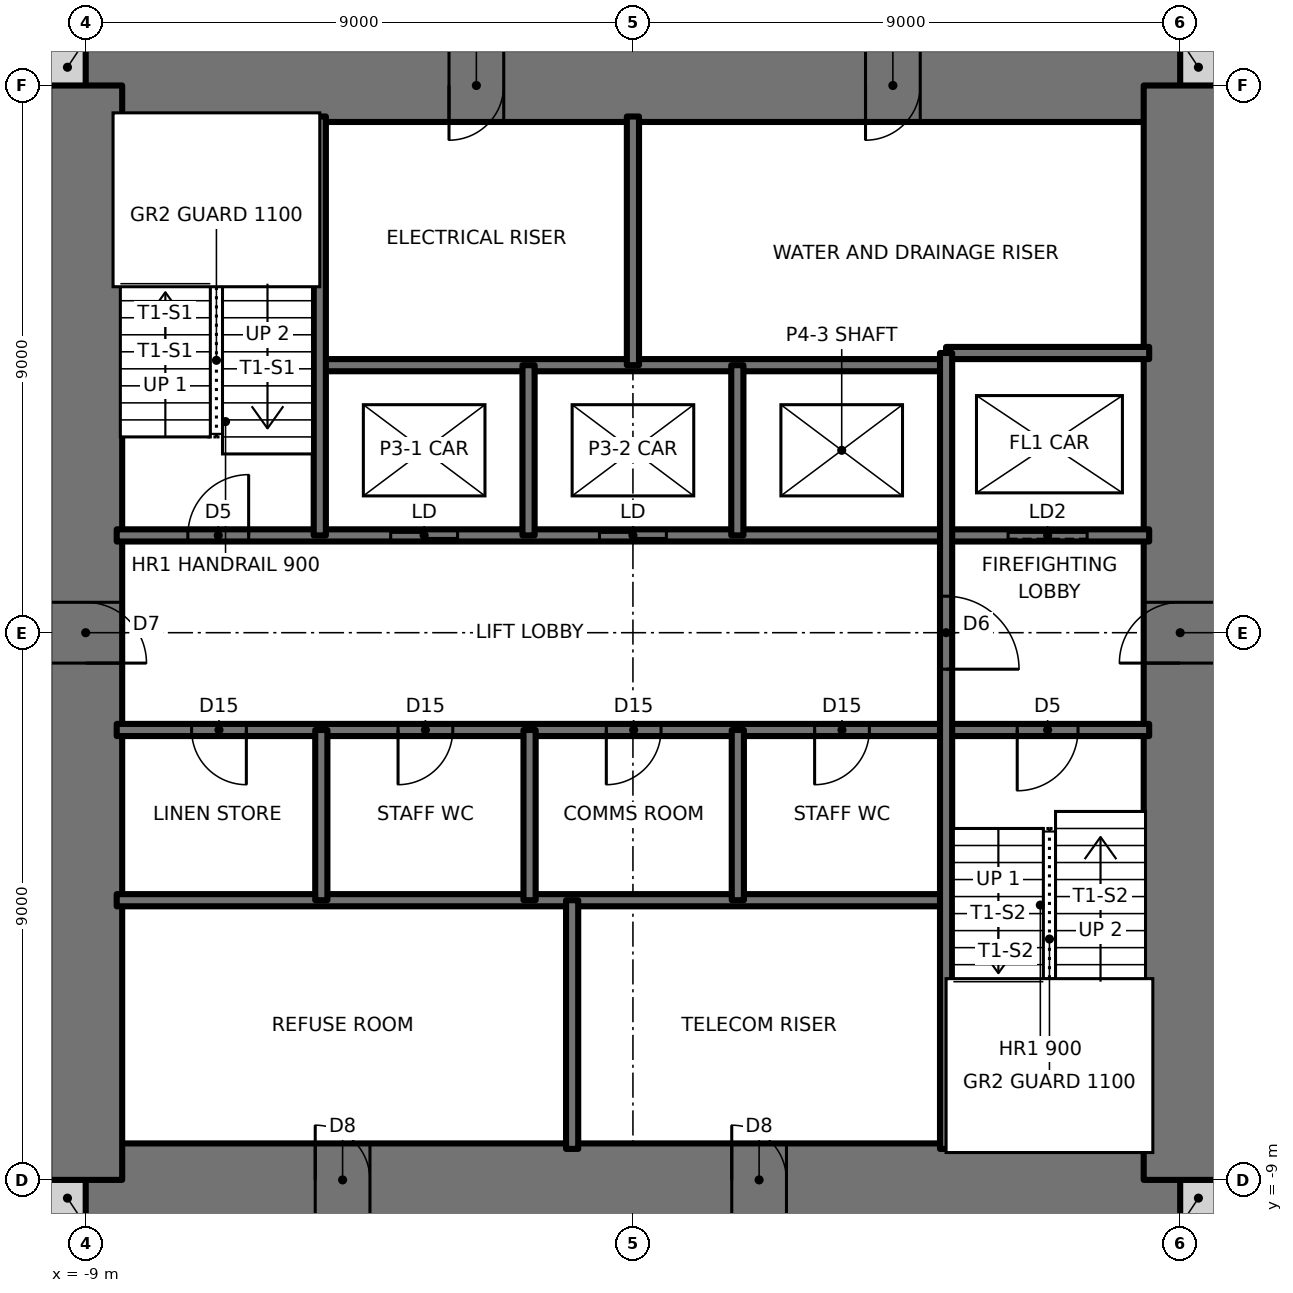
"""IFC4 building model, lengths in metres.
Left out: names, types, materials, properties, quantities, classifications, styles, units other than length and angle.
Written with IfcOpenShell. Run it as: python <this file> out.ifc"""

import sys

from ifc_helpers import new_model, si_unit, direction, frame, frame_2d, origin, place, context, subcontext, project, spatial, rectangle, extrude, element, fill, save


model = new_model("IFC4")
c1 = context("Model", 3, precision=1e-05, world=origin(), true_north=direction((0.0, 1.0)))
c2 = subcontext(c1, "Body", "Model", "MODEL_VIEW")
j1 = project(units=[si_unit("LENGTHUNIT", "METRE"), si_unit("PLANEANGLEUNIT", "RADIAN")], contexts=[c1])
p1 = place(None, origin())
s1 = spatial("IfcSite", under=j1, at=p1, CompositionType="ELEMENT")
p2 = place(p1, origin())
s2 = spatial("IfcBuilding", under=s1, at=p2, CompositionType="ELEMENT")
p3 = place(p2, frame((0.0, 0.0, 149.5)))
s3 = spatial("IfcBuildingStorey", under=s2, at=p3, CompositionType="ELEMENT", Elevation=149.5)
for number, where, z_axis, x_axis in (
    (1, (-9.6, -9.3, 0.0), (0.0, 0.0, 1.0), (1.0, 0.0, 0.0)),
    (2, (9.0, -9.3, 0.0), (0.0, 0.0, 1.0), (1.0, 0.0, 0.0)),
    (3, (9.0, 9.3, 0.0), (0.0, 0.0, 1.0), (1.0, 0.0, 0.0)),
    (4, (-9.6, 9.3, 0.0), (0.0, 0.0, 1.0), (1.0, 0.0, 0.0)),
):
    element("IfcWall", number, at=place(p3, frame(where, z_axis=z_axis, x_axis=x_axis)), inside=s3, PredefinedType="SOLIDWALL", context=c2, shape_type="SweptSolid", body=[
        extrude(rectangle(XDim=0.6, YDim=0.6, at=frame_2d((0.3, 0.0))), origin(), (0.0, 0.0, 1.0), 3.5),
    ])
p4 = place(p3, frame((-9.0, -9.0, 0.0), z_axis=(0.0, 0.0, 1.0), x_axis=(1.0, 0.0, 0.0)))
e5 = element("IfcWall", 5, at=p4, inside=s3, PredefinedType="SHEAR", context=c2, shape_type="SweptSolid", body=[
    extrude(rectangle(XDim=18.0, YDim=1.2, at=frame_2d((9.0, 0.0))), origin(), (0.0, 0.0, 1.0), 3.5),
])
p5 = place(p4, frame((3.775, 0.0, 0.0)))
e6 = element("IfcOpeningElement", 6, at=p5, cuts=e5, PredefinedType="OPENING", context=c2, shape_type="SweptSolid", body=[
    extrude(rectangle(XDim=0.9, YDim=2.1, at=frame_2d((0.45, 1.05))), frame((0.0, 0.61, 0.0), z_axis=(0.0, -1.0, 0.0), x_axis=(1.0, 0.0, 0.0)), (0.0, 0.0, 1.0), 1.22),
])
p6 = place(p4, frame((10.625, 0.0, 0.0)))
e7 = element("IfcOpeningElement", 7, at=p6, cuts=e5, PredefinedType="OPENING", context=c2, shape_type="SweptSolid", body=[
    extrude(rectangle(XDim=0.9, YDim=2.1, at=frame_2d((0.45, 1.05))), frame((0.0, 0.61, 0.0), z_axis=(0.0, -1.0, 0.0), x_axis=(1.0, 0.0, 0.0)), (0.0, 0.0, 1.0), 1.22),
])
p7 = place(p3, frame((9.0, 9.0, 0.0), z_axis=(0.0, 0.0, 1.0), x_axis=(-1.0, 0.0, 0.0)))
e8 = element("IfcWall", 8, at=p7, inside=s3, PredefinedType="SHEAR", context=c2, shape_type="SweptSolid", body=[
    extrude(rectangle(XDim=18.0, YDim=1.2, at=frame_2d((9.0, 0.0))), origin(), (0.0, 0.0, 1.0), 3.5),
])
p8 = place(p7, frame((11.125, 0.0, 0.0)))
e9 = element("IfcOpeningElement", 9, at=p8, cuts=e8, PredefinedType="OPENING", context=c2, shape_type="SweptSolid", body=[
    extrude(rectangle(XDim=0.9, YDim=2.1, at=frame_2d((0.45, 1.05))), frame((0.0, 0.61, 0.0), z_axis=(0.0, -1.0, 0.0), x_axis=(1.0, 0.0, 0.0)), (0.0, 0.0, 1.0), 1.22),
])
p9 = place(p7, frame((4.275, 0.0, 0.0)))
e10 = element("IfcOpeningElement", 10, at=p9, cuts=e8, PredefinedType="OPENING", context=c2, shape_type="SweptSolid", body=[
    extrude(rectangle(XDim=0.9, YDim=2.1, at=frame_2d((0.45, 1.05))), frame((0.0, 0.61, 0.0), z_axis=(0.0, -1.0, 0.0), x_axis=(1.0, 0.0, 0.0)), (0.0, 0.0, 1.0), 1.22),
])
p10 = place(p3, frame((9.0, -9.0, 0.0), z_axis=(0.0, 0.0, 1.0), x_axis=(0.0, 1.0, 0.0)))
e11 = element("IfcWall", 11, at=p10, inside=s3, PredefinedType="SHEAR", context=c2, shape_type="SweptSolid", body=[
    extrude(rectangle(XDim=18.0, YDim=1.2, at=frame_2d((9.0, 0.0))), origin(), (0.0, 0.0, 1.0), 3.5),
])
p11 = place(p10, frame((8.5, 0.0, 0.0)))
e12 = element("IfcOpeningElement", 12, at=p11, cuts=e11, PredefinedType="OPENING", context=c2, shape_type="SweptSolid", body=[
    extrude(rectangle(XDim=1.0, YDim=2.1, at=frame_2d((0.5, 1.05))), frame((0.0, 0.61, 0.0), z_axis=(0.0, -1.0, 0.0), x_axis=(1.0, 0.0, 0.0)), (0.0, 0.0, 1.0), 1.22),
])
p12 = place(p3, frame((-9.0, 9.0, 0.0), z_axis=(0.0, 0.0, 1.0), x_axis=(0.0, -1.0, 0.0)))
e13 = element("IfcWall", 13, at=p12, inside=s3, PredefinedType="SHEAR", context=c2, shape_type="SweptSolid", body=[
    extrude(rectangle(XDim=18.0, YDim=1.2, at=frame_2d((9.0, 0.0))), origin(), (0.0, 0.0, 1.0), 3.5),
])
p13 = place(p12, frame((8.5, 0.0, 0.0)))
e14 = element("IfcOpeningElement", 14, at=p13, cuts=e13, PredefinedType="OPENING", context=c2, shape_type="SweptSolid", body=[
    extrude(rectangle(XDim=1.0, YDim=2.1, at=frame_2d((0.5, 1.05))), frame((0.0, 0.61, 0.0), z_axis=(0.0, -1.0, 0.0), x_axis=(1.0, 0.0, 0.0)), (0.0, 0.0, 1.0), 1.22),
])
p14 = place(p3, frame((-8.49, -4.4, 0.0), z_axis=(0.0, 0.0, 1.0), x_axis=(1.0, 0.0, 0.0)))
e15 = element("IfcWall", 15, at=p14, inside=s3, PredefinedType="SOLIDWALL", context=c2, shape_type="SweptSolid", body=[
    extrude(rectangle(XDim=13.64, YDim=0.2, at=frame_2d((6.82, 0.0))), origin(), (0.0, 0.0, 1.0), 3.5),
])
p15 = place(p3, frame((-8.49, -1.6, 0.0), z_axis=(0.0, 0.0, 1.0), x_axis=(1.0, 0.0, 0.0)))
e16 = element("IfcWall", 16, at=p15, inside=s3, PredefinedType="SOLIDWALL", context=c2, shape_type="SweptSolid", body=[
    extrude(rectangle(XDim=16.98, YDim=0.2, at=frame_2d((8.49, 0.0))), origin(), (0.0, 0.0, 1.0), 3.5),
])
p16 = place(p15, frame((14.81, 0.0, 0.0)))
e17 = element("IfcOpeningElement", 17, at=p16, cuts=e16, PredefinedType="OPENING", context=c2, shape_type="SweptSolid", body=[
    extrude(rectangle(XDim=1.0, YDim=2.1, at=frame_2d((0.5, 1.05))), frame((0.0, 0.11, 0.0), z_axis=(0.0, -1.0, 0.0), x_axis=(1.0, 0.0, 0.0)), (0.0, 0.0, 1.0), 0.22),
])
p17 = place(p15, frame((1.232, 0.0, 0.0)))
e18 = element("IfcOpeningElement", 18, at=p17, cuts=e16, PredefinedType="OPENING", context=c2, shape_type="SweptSolid", body=[
    extrude(rectangle(XDim=0.9, YDim=2.1, at=frame_2d((0.45, 1.05))), frame((0.0, 0.11, 0.0), z_axis=(0.0, -1.0, 0.0), x_axis=(1.0, 0.0, 0.0)), (0.0, 0.0, 1.0), 0.22),
])
p18 = place(p15, frame((4.627, 0.0, 0.0)))
e19 = element("IfcOpeningElement", 19, at=p18, cuts=e16, PredefinedType="OPENING", context=c2, shape_type="SweptSolid", body=[
    extrude(rectangle(XDim=0.9, YDim=2.1, at=frame_2d((0.45, 1.05))), frame((0.0, 0.11, 0.0), z_axis=(0.0, -1.0, 0.0), x_axis=(1.0, 0.0, 0.0)), (0.0, 0.0, 1.0), 0.22),
])
p19 = place(p15, frame((8.052, 0.0, 0.0)))
e20 = element("IfcOpeningElement", 20, at=p19, cuts=e16, PredefinedType="OPENING", context=c2, shape_type="SweptSolid", body=[
    extrude(rectangle(XDim=0.9, YDim=2.1, at=frame_2d((0.45, 1.05))), frame((0.0, 0.11, 0.0), z_axis=(0.0, -1.0, 0.0), x_axis=(1.0, 0.0, 0.0)), (0.0, 0.0, 1.0), 0.22),
])
p20 = place(p15, frame((11.478, 0.0, 0.0)))
e21 = element("IfcOpeningElement", 21, at=p20, cuts=e16, PredefinedType="OPENING", context=c2, shape_type="SweptSolid", body=[
    extrude(rectangle(XDim=0.9, YDim=2.1, at=frame_2d((0.45, 1.05))), frame((0.0, 0.11, 0.0), z_axis=(0.0, -1.0, 0.0), x_axis=(1.0, 0.0, 0.0)), (0.0, 0.0, 1.0), 0.22),
])
p21 = place(p3, frame((-8.49, 1.6, 0.0), z_axis=(0.0, 0.0, 1.0), x_axis=(1.0, 0.0, 0.0)))
e22 = element("IfcWall", 22, at=p21, inside=s3, PredefinedType="SOLIDWALL", context=c2, shape_type="SweptSolid", body=[
    extrude(rectangle(XDim=16.98, YDim=0.2, at=frame_2d((8.49, 0.0))), origin(), (0.0, 0.0, 1.0), 3.5),
])
p22 = place(p21, frame((1.17, 0.0, 0.0)))
e23 = element("IfcOpeningElement", 23, at=p22, cuts=e22, PredefinedType="OPENING", context=c2, shape_type="SweptSolid", body=[
    extrude(rectangle(XDim=1.0, YDim=2.1, at=frame_2d((0.5, 1.05))), frame((0.0, 0.11, 0.0), z_axis=(0.0, -1.0, 0.0), x_axis=(1.0, 0.0, 0.0)), (0.0, 0.0, 1.0), 0.22),
])
p23 = place(p21, frame((4.506, 0.0, 0.0)))
e24 = element("IfcOpeningElement", 24, at=p23, cuts=e22, PredefinedType="OPENING", context=c2, shape_type="SweptSolid", body=[
    extrude(rectangle(XDim=1.1, YDim=2.1, at=frame_2d((0.55, 1.05))), frame((0.0, 0.11, 0.0), z_axis=(0.0, -1.0, 0.0), x_axis=(1.0, 0.0, 0.0)), (0.0, 0.0, 1.0), 0.22),
])
p24 = place(p21, frame((7.94, 0.0, 0.0)))
e25 = element("IfcOpeningElement", 25, at=p24, cuts=e22, PredefinedType="OPENING", context=c2, shape_type="SweptSolid", body=[
    extrude(rectangle(XDim=1.1, YDim=2.1, at=frame_2d((0.55, 1.05))), frame((0.0, 0.11, 0.0), z_axis=(0.0, -1.0, 0.0), x_axis=(1.0, 0.0, 0.0)), (0.0, 0.0, 1.0), 0.22),
])
p25 = place(p21, frame((14.66, 0.0, 0.0)))
e26 = element("IfcOpeningElement", 26, at=p25, cuts=e22, PredefinedType="OPENING", context=c2, shape_type="SweptSolid", body=[
    extrude(rectangle(XDim=1.3, YDim=2.1, at=frame_2d((0.65, 1.05))), frame((0.0, 0.11, 0.0), z_axis=(0.0, -1.0, 0.0), x_axis=(1.0, 0.0, 0.0)), (0.0, 0.0, 1.0), 0.22),
])
p26 = place(p3, frame((-5.15, 4.4, 0.0), z_axis=(0.0, 0.0, 1.0), x_axis=(1.0, 0.0, 0.0)))
e27 = element("IfcWall", 27, at=p26, inside=s3, PredefinedType="SOLIDWALL", context=c2, shape_type="SweptSolid", body=[
    extrude(rectangle(XDim=10.3, YDim=0.2, at=frame_2d((5.15, 0.0))), origin(), (0.0, 0.0, 1.0), 3.5),
])
p27 = place(p3, frame((5.15, 4.6, 0.0), z_axis=(0.0, 0.0, 1.0), x_axis=(1.0, 0.0, 0.0)))
e28 = element("IfcWall", 28, at=p27, inside=s3, PredefinedType="SOLIDWALL", context=c2, shape_type="SweptSolid", body=[
    extrude(rectangle(XDim=3.34, YDim=0.2, at=frame_2d((1.67, 0.0))), origin(), (0.0, 0.0, 1.0), 3.5),
])
p28 = place(p3, frame((5.15, -8.49, 0.0), z_axis=(0.0, 0.0, 1.0), x_axis=(0.0, 1.0, 0.0)))
e29 = element("IfcWall", 29, at=p28, inside=s3, PredefinedType="SOLIDWALL", context=c2, shape_type="SweptSolid", body=[
    extrude(rectangle(XDim=13.09, YDim=0.2, at=frame_2d((6.545, 0.0))), origin(), (0.0, 0.0, 1.0), 3.5),
])
p29 = place(p28, frame((7.89, 0.0, 0.0)))
e30 = element("IfcOpeningElement", 30, at=p29, cuts=e29, PredefinedType="OPENING", context=c2, shape_type="SweptSolid", body=[
    extrude(rectangle(XDim=1.2, YDim=2.1, at=frame_2d((0.6, 1.05))), frame((0.0, 0.11, 0.0), z_axis=(0.0, -1.0, 0.0), x_axis=(1.0, 0.0, 0.0)), (0.0, 0.0, 1.0), 0.22),
])
for number, where, z_axis, x_axis in (
    (31, (1.725, -4.4, 0.0), (0.0, 0.0, 1.0), (0.0, 1.0, 0.0)),
    (32, (1.717, 1.6, 0.0), (0.0, 0.0, 1.0), (0.0, 1.0, 0.0)),
):
    element("IfcWall", number, at=place(p3, frame(where, z_axis=z_axis, x_axis=x_axis)), inside=s3, PredefinedType="SOLIDWALL", context=c2, shape_type="SweptSolid", body=[
        extrude(rectangle(XDim=2.8, YDim=0.2, at=frame_2d((1.4, 0.0))), origin(), (0.0, 0.0, 1.0), 3.5),
    ])
for number, where, z_axis, x_axis in (
    (33, (0.0, 4.4, 0.0), (0.0, 0.0, 1.0), (0.0, 1.0, 0.0)),
    (34, (-1.0, -8.49, 0.0), (0.0, 0.0, 1.0), (0.0, 1.0, 0.0)),
):
    element("IfcWall", number, at=place(p3, frame(where, z_axis=z_axis, x_axis=x_axis)), inside=s3, PredefinedType="SOLIDWALL", context=c2, shape_type="SweptSolid", body=[
        extrude(rectangle(XDim=4.09, YDim=0.2, at=frame_2d((2.045, 0.0))), origin(), (0.0, 0.0, 1.0), 3.5),
    ])
for number, where, z_axis, x_axis in (
    (35, (-1.7, -4.4, 0.0), (0.0, 0.0, 1.0), (0.0, 1.0, 0.0)),
    (36, (-1.717, 1.6, 0.0), (0.0, 0.0, 1.0), (0.0, 1.0, 0.0)),
    (37, (-5.125, -4.4, 0.0), (0.0, 0.0, 1.0), (0.0, 1.0, 0.0)),
):
    element("IfcWall", number, at=place(p3, frame(where, z_axis=z_axis, x_axis=x_axis)), inside=s3, PredefinedType="SOLIDWALL", context=c2, shape_type="SweptSolid", body=[
        extrude(rectangle(XDim=2.8, YDim=0.2, at=frame_2d((1.4, 0.0))), origin(), (0.0, 0.0, 1.0), 3.5),
    ])
p30 = place(p3, frame((-5.15, 1.6, 0.0), z_axis=(0.0, 0.0, 1.0), x_axis=(0.0, 1.0, 0.0)))
e38 = element("IfcWall", 38, at=p30, inside=s3, PredefinedType="SOLIDWALL", context=c2, shape_type="SweptSolid", body=[
    extrude(rectangle(XDim=6.89, YDim=0.2, at=frame_2d((3.445, 0.0))), origin(), (0.0, 0.0, 1.0), 3.5),
])
p31 = place(p22, origin())
e39 = element("IfcDoor", 39, at=p31, inside=s3, OperationType="SINGLE_SWING_RIGHT", PredefinedType="DOOR", context=c2, shape_type="SweptSolid", body=[
    extrude(rectangle(XDim=1.0, YDim=2.1, at=frame_2d((0.5, 1.05))), frame((0.0, 0.025, 0.0), z_axis=(0.0, -1.0, 0.0), x_axis=(1.0, 0.0, 0.0)), (0.0, 0.0, 1.0), 0.05),
])
fill(e23, e39)
p32 = place(p16, frame((1.0, 0.0, 0.0), z_axis=(0.0, 0.0, 1.0), x_axis=(-1.0, 0.0, 0.0)))
e40 = element("IfcDoor", 40, at=p32, inside=s3, OperationType="SINGLE_SWING_RIGHT", PredefinedType="DOOR", context=c2, shape_type="SweptSolid", body=[
    extrude(rectangle(XDim=1.0, YDim=2.1, at=frame_2d((0.5, 1.05))), frame((0.0, 0.025, 0.0), z_axis=(0.0, -1.0, 0.0), x_axis=(1.0, 0.0, 0.0)), (0.0, 0.0, 1.0), 0.05),
])
fill(e17, e40)
p33 = place(p29, frame((1.2, 0.0, 0.0), z_axis=(0.0, 0.0, 1.0), x_axis=(-1.0, 0.0, 0.0)))
e41 = element("IfcDoor", 41, at=p33, inside=s3, OperationType="SINGLE_SWING_RIGHT", PredefinedType="DOOR", context=c2, shape_type="SweptSolid", body=[
    extrude(rectangle(XDim=1.2, YDim=2.1, at=frame_2d((0.6, 1.05))), frame((0.0, 0.025, 0.0), z_axis=(0.0, -1.0, 0.0), x_axis=(1.0, 0.0, 0.0)), (0.0, 0.0, 1.0), 0.05),
])
fill(e30, e41)
p34 = place(p17, frame((0.9, 0.0, 0.0), z_axis=(0.0, 0.0, 1.0), x_axis=(-1.0, 0.0, 0.0)))
e42 = element("IfcDoor", 42, at=p34, inside=s3, OperationType="SINGLE_SWING_LEFT", PredefinedType="DOOR", context=c2, shape_type="SweptSolid", body=[
    extrude(rectangle(XDim=0.9, YDim=2.1, at=frame_2d((0.45, 1.05))), frame((0.0, 0.025, 0.0), z_axis=(0.0, -1.0, 0.0), x_axis=(1.0, 0.0, 0.0)), (0.0, 0.0, 1.0), 0.05),
])
fill(e18, e42)
p35 = place(p18, frame((0.9, 0.0, 0.0), z_axis=(0.0, 0.0, 1.0), x_axis=(-1.0, 0.0, 0.0)))
e43 = element("IfcDoor", 43, at=p35, inside=s3, OperationType="SINGLE_SWING_RIGHT", PredefinedType="DOOR", context=c2, shape_type="SweptSolid", body=[
    extrude(rectangle(XDim=0.9, YDim=2.1, at=frame_2d((0.45, 1.05))), frame((0.0, 0.025, 0.0), z_axis=(0.0, -1.0, 0.0), x_axis=(1.0, 0.0, 0.0)), (0.0, 0.0, 1.0), 0.05),
])
fill(e19, e43)
p36 = place(p19, frame((0.9, 0.0, 0.0), z_axis=(0.0, 0.0, 1.0), x_axis=(-1.0, 0.0, 0.0)))
e44 = element("IfcDoor", 44, at=p36, inside=s3, OperationType="SINGLE_SWING_RIGHT", PredefinedType="DOOR", context=c2, shape_type="SweptSolid", body=[
    extrude(rectangle(XDim=0.9, YDim=2.1, at=frame_2d((0.45, 1.05))), frame((0.0, 0.025, 0.0), z_axis=(0.0, -1.0, 0.0), x_axis=(1.0, 0.0, 0.0)), (0.0, 0.0, 1.0), 0.05),
])
fill(e20, e44)
p37 = place(p20, frame((0.9, 0.0, 0.0), z_axis=(0.0, 0.0, 1.0), x_axis=(-1.0, 0.0, 0.0)))
e45 = element("IfcDoor", 45, at=p37, inside=s3, OperationType="SINGLE_SWING_RIGHT", PredefinedType="DOOR", context=c2, shape_type="SweptSolid", body=[
    extrude(rectangle(XDim=0.9, YDim=2.1, at=frame_2d((0.45, 1.05))), frame((0.0, 0.025, 0.0), z_axis=(0.0, -1.0, 0.0), x_axis=(1.0, 0.0, 0.0)), (0.0, 0.0, 1.0), 0.05),
])
fill(e21, e45)
p38 = place(p13, origin())
e46 = element("IfcDoor", 46, at=p38, inside=s3, OperationType="SINGLE_SWING_RIGHT", PredefinedType="DOOR", context=c2, shape_type="SweptSolid", body=[
    extrude(rectangle(XDim=1.0, YDim=2.1, at=frame_2d((0.5, 1.05))), frame((0.0, 0.025, 0.0), z_axis=(0.0, -1.0, 0.0), x_axis=(1.0, 0.0, 0.0)), (0.0, 0.0, 1.0), 0.05),
])
fill(e14, e46)
p39 = place(p11, origin())
e47 = element("IfcDoor", 47, at=p39, inside=s3, OperationType="SINGLE_SWING_LEFT", PredefinedType="DOOR", context=c2, shape_type="SweptSolid", body=[
    extrude(rectangle(XDim=1.0, YDim=2.1, at=frame_2d((0.5, 1.05))), frame((0.0, 0.025, 0.0), z_axis=(0.0, -1.0, 0.0), x_axis=(1.0, 0.0, 0.0)), (0.0, 0.0, 1.0), 0.05),
])
fill(e12, e47)
p40 = place(p8, origin())
e48 = element("IfcDoor", 48, at=p40, inside=s3, OperationType="SINGLE_SWING_RIGHT", PredefinedType="DOOR", context=c2, shape_type="SweptSolid", body=[
    extrude(rectangle(XDim=0.9, YDim=2.1, at=frame_2d((0.45, 1.05))), frame((0.0, 0.025, 0.0), z_axis=(0.0, -1.0, 0.0), x_axis=(1.0, 0.0, 0.0)), (0.0, 0.0, 1.0), 0.05),
])
fill(e9, e48)
p41 = place(p9, origin())
e49 = element("IfcDoor", 49, at=p41, inside=s3, OperationType="SINGLE_SWING_RIGHT", PredefinedType="DOOR", context=c2, shape_type="SweptSolid", body=[
    extrude(rectangle(XDim=0.9, YDim=2.1, at=frame_2d((0.45, 1.05))), frame((0.0, 0.025, 0.0), z_axis=(0.0, -1.0, 0.0), x_axis=(1.0, 0.0, 0.0)), (0.0, 0.0, 1.0), 0.05),
])
fill(e10, e49)
p42 = place(p5, origin())
e50 = element("IfcDoor", 50, at=p42, inside=s3, OperationType="SINGLE_SWING_LEFT", PredefinedType="DOOR", context=c2, shape_type="SweptSolid", body=[
    extrude(rectangle(XDim=0.9, YDim=2.1, at=frame_2d((0.45, 1.05))), frame((0.0, 0.025, 0.0), z_axis=(0.0, -1.0, 0.0), x_axis=(1.0, 0.0, 0.0)), (0.0, 0.0, 1.0), 0.05),
])
fill(e6, e50)
p43 = place(p6, origin())
e51 = element("IfcDoor", 51, at=p43, inside=s3, OperationType="SINGLE_SWING_LEFT", PredefinedType="DOOR", context=c2, shape_type="SweptSolid", body=[
    extrude(rectangle(XDim=0.9, YDim=2.1, at=frame_2d((0.45, 1.05))), frame((0.0, 0.025, 0.0), z_axis=(0.0, -1.0, 0.0), x_axis=(1.0, 0.0, 0.0)), (0.0, 0.0, 1.0), 0.05),
])
fill(e7, e51)
p44 = place(p23, origin())
e52 = element("IfcDoor", 52, at=p44, inside=s3, OperationType="DOUBLE_DOOR_SLIDING", PredefinedType="DOOR", context=c2, shape_type="SweptSolid", body=[
    extrude(rectangle(XDim=1.1, YDim=2.1, at=frame_2d((0.55, 1.05))), frame((0.0, 0.025, 0.0), z_axis=(0.0, -1.0, 0.0), x_axis=(1.0, 0.0, 0.0)), (0.0, 0.0, 1.0), 0.05),
])
fill(e24, e52)
p45 = place(p24, origin())
e53 = element("IfcDoor", 53, at=p45, inside=s3, OperationType="DOUBLE_DOOR_SLIDING", PredefinedType="DOOR", context=c2, shape_type="SweptSolid", body=[
    extrude(rectangle(XDim=1.1, YDim=2.1, at=frame_2d((0.55, 1.05))), frame((0.0, 0.025, 0.0), z_axis=(0.0, -1.0, 0.0), x_axis=(1.0, 0.0, 0.0)), (0.0, 0.0, 1.0), 0.05),
])
fill(e25, e53)
p46 = place(p25, origin())
e54 = element("IfcDoor", 54, at=p46, inside=s3, OperationType="SLIDING_TO_LEFT", PredefinedType="DOOR", context=c2, shape_type="SweptSolid", body=[
    extrude(rectangle(XDim=1.3, YDim=2.1, at=frame_2d((0.65, 1.05))), frame((0.0, 0.025, 0.0), z_axis=(0.0, -1.0, 0.0), x_axis=(1.0, 0.0, 0.0)), (0.0, 0.0, 1.0), 0.05),
])
fill(e26, e54)
save(model, sys.argv[1])
